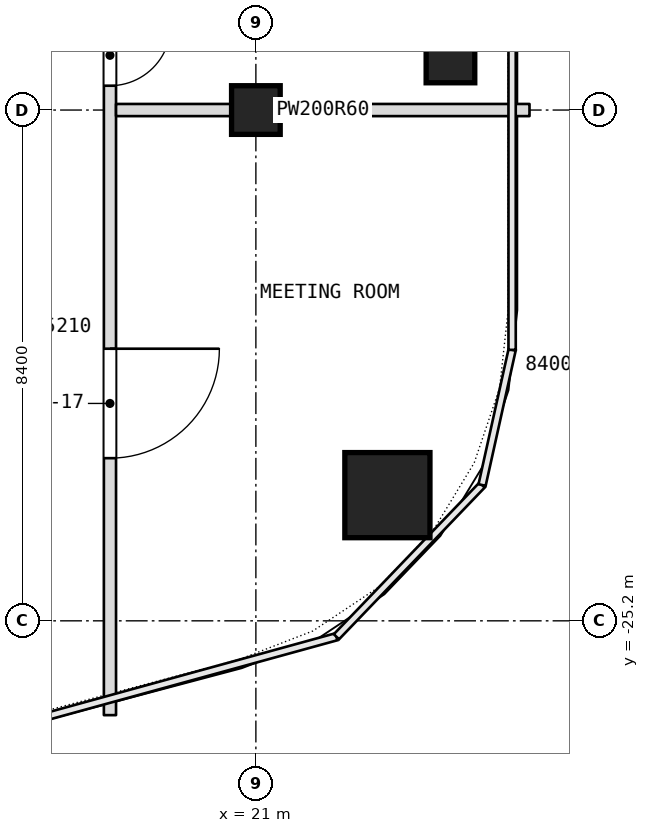
"""IFC4 building model, lengths in metres.
Left out: names, types, materials, properties, quantities, classifications, styles, units other than length and angle.
Written with IfcOpenShell. Run it as: python <this file> out.ifc"""

import sys

from ifc_helpers import new_model, si_unit, direction, frame, frame_2d, origin, origin_2d, place, context, subcontext, project, spatial, rectangle, extrude, element, fill, save


model = new_model("IFC4")
c1 = context("Model", 3, precision=1e-05, world=origin(), true_north=direction((0.0, 1.0)))
c2 = subcontext(c1, "Body", "Model", "MODEL_VIEW")
j1 = project(units=[si_unit("LENGTHUNIT", "METRE"), si_unit("PLANEANGLEUNIT", "RADIAN")], contexts=[c1])
p1 = place(None, origin())
s1 = spatial("IfcSite", under=j1, at=p1, CompositionType="ELEMENT")
p2 = place(p1, origin())
s2 = spatial("IfcBuilding", under=s1, at=p2, CompositionType="ELEMENT")
p3 = place(p2, frame((0.0, 0.0, 223.7)))
s3 = spatial("IfcBuildingStorey", under=s2, at=p3, CompositionType="ELEMENT", Elevation=223.7)
p4 = place(p3, frame((23.163, -23.133, 0.0), z_axis=(0.0, 0.0, 1.0), x_axis=(1.0, 0.0, 0.0)))
e1 = element("IfcColumn", 1, at=p4, inside=s3, PredefinedType="COLUMN", context=c2, shape_type="SweptSolid", body=[
    extrude(rectangle(XDim=1.4, YDim=1.4, at=origin_2d()), origin(), (0.0, 0.0, 1.0), 3.6),
])
for number, where, z_axis, x_axis in (
    (2, (21.0, -16.8, 0.0), (0.0, 0.0, 1.0), (1.0, 0.0, 0.0)),
    (3, (24.2, -15.952, 0.0), (0.0, 0.0, 1.0), (1.0, 0.0, 0.0)),
):
    element("IfcColumn", number, at=place(p3, frame(where, z_axis=z_axis, x_axis=x_axis)), inside=s3, PredefinedType="COLUMN", context=c2, shape_type="SweptSolid", body=[
        extrude(rectangle(XDim=0.8, YDim=0.8, at=origin_2d()), origin(), (0.0, 0.0, 1.0), 3.6),
    ])
p5 = place(p3, frame((18.6, -26.751, 0.0), z_axis=(0.0, 0.0, 1.0), x_axis=(0.0, 1.0, 0.0)))
e4 = element("IfcWall", 4, at=p5, inside=s3, PredefinedType="PARTITIONING", context=c2, shape_type="SweptSolid", body=[
    extrude(rectangle(XDim=49.091, YDim=0.2, at=frame_2d((24.545, 0.0))), origin(), (0.0, 0.0, 1.0), 3.34),
])
p6 = place(p5, frame((4.226, 0.0, 0.0)))
e5 = element("IfcOpeningElement", 5, at=p6, cuts=e4, PredefinedType="OPENING", context=c2, shape_type="SweptSolid", body=[
    extrude(rectangle(XDim=1.8, YDim=2.1, at=frame_2d((0.9, 1.05))), frame((0.0, 0.1, 0.0), z_axis=(0.0, -1.0, 0.0), x_axis=(1.0, 0.0, 0.0)), (0.0, 0.0, 1.0), 0.2),
])
p7 = place(p5, frame((10.351, 0.0, 0.0)))
e6 = element("IfcOpeningElement", 6, at=p7, cuts=e4, PredefinedType="OPENING", context=c2, shape_type="SweptSolid", body=[
    extrude(rectangle(XDim=1.0, YDim=2.1, at=frame_2d((0.5, 1.05))), frame((0.0, 0.1, 0.0), z_axis=(0.0, -1.0, 0.0), x_axis=(1.0, 0.0, 0.0)), (0.0, 0.0, 1.0), 0.2),
])
p8 = place(p5, frame((16.951, 0.0, 0.0)))
e7 = element("IfcOpeningElement", 7, at=p8, cuts=e4, PredefinedType="OPENING", context=c2, shape_type="SweptSolid", body=[
    extrude(rectangle(XDim=1.0, YDim=2.1, at=frame_2d((0.5, 1.05))), frame((0.0, 0.1, 0.0), z_axis=(0.0, -1.0, 0.0), x_axis=(1.0, 0.0, 0.0)), (0.0, 0.0, 1.0), 0.2),
])
p9 = place(p5, frame((22.051, 0.0, 0.0)))
e8 = element("IfcOpeningElement", 8, at=p9, cuts=e4, PredefinedType="OPENING", context=c2, shape_type="SweptSolid", body=[
    extrude(rectangle(XDim=1.1, YDim=2.1, at=frame_2d((0.55, 1.05))), frame((0.0, 0.1, 0.0), z_axis=(0.0, -1.0, 0.0), x_axis=(1.0, 0.0, 0.0)), (0.0, 0.0, 1.0), 0.2),
])
p10 = place(p5, frame((30.051, 0.0, 0.0)))
e9 = element("IfcOpeningElement", 9, at=p10, cuts=e4, PredefinedType="OPENING", context=c2, shape_type="SweptSolid", body=[
    extrude(rectangle(XDim=1.8, YDim=2.1, at=frame_2d((0.9, 1.05))), frame((0.0, 0.1, 0.0), z_axis=(0.0, -1.0, 0.0), x_axis=(1.0, 0.0, 0.0)), (0.0, 0.0, 1.0), 0.2),
])
p11 = place(p5, frame((38.851, 0.0, 0.0)))
e10 = element("IfcOpeningElement", 10, at=p11, cuts=e4, PredefinedType="OPENING", context=c2, shape_type="SweptSolid", body=[
    extrude(rectangle(XDim=1.1, YDim=2.1, at=frame_2d((0.55, 1.05))), frame((0.0, 0.1, 0.0), z_axis=(0.0, -1.0, 0.0), x_axis=(1.0, 0.0, 0.0)), (0.0, 0.0, 1.0), 0.2),
])
p12 = place(p5, frame((44.051, 0.0, 0.0)))
e11 = element("IfcOpeningElement", 11, at=p12, cuts=e4, PredefinedType="OPENING", context=c2, shape_type="SweptSolid", body=[
    extrude(rectangle(XDim=1.0, YDim=2.1, at=frame_2d((0.5, 1.05))), frame((0.0, 0.1, 0.0), z_axis=(0.0, -1.0, 0.0), x_axis=(1.0, 0.0, 0.0)), (0.0, 0.0, 1.0), 0.2),
])
p13 = place(p3, frame((18.7, -16.8, 0.0), z_axis=(0.0, 0.0, 1.0), x_axis=(1.0, 0.0, 0.0)))
e12 = element("IfcWall", 12, at=p13, inside=s3, PredefinedType="PARTITIONING", context=c2, shape_type="SweptSolid", body=[
    extrude(rectangle(XDim=6.8, YDim=0.2, at=frame_2d((3.4, 0.0))), origin(), (0.0, 0.0, 1.0), 2.94),
])
p14 = place(p6, origin())
e13 = element("IfcDoor", 13, at=p14, inside=s3, OperationType="DOUBLE_DOOR_SINGLE_SWING", PredefinedType="DOOR", context=c2, shape_type="SweptSolid", body=[
    extrude(rectangle(XDim=1.8, YDim=2.1, at=frame_2d((0.9, 1.05))), frame((0.0, 0.025, 0.0), z_axis=(0.0, -1.0, 0.0), x_axis=(1.0, 0.0, 0.0)), (0.0, 0.0, 1.0), 0.05),
])
fill(e5, e13)
p15 = place(p7, origin())
e14 = element("IfcDoor", 14, at=p15, inside=s3, OperationType="SINGLE_SWING_RIGHT", PredefinedType="DOOR", context=c2, shape_type="SweptSolid", body=[
    extrude(rectangle(XDim=1.0, YDim=2.1, at=frame_2d((0.5, 1.05))), frame((0.0, 0.025, 0.0), z_axis=(0.0, -1.0, 0.0), x_axis=(1.0, 0.0, 0.0)), (0.0, 0.0, 1.0), 0.05),
])
fill(e6, e14)
save(model, sys.argv[1])
